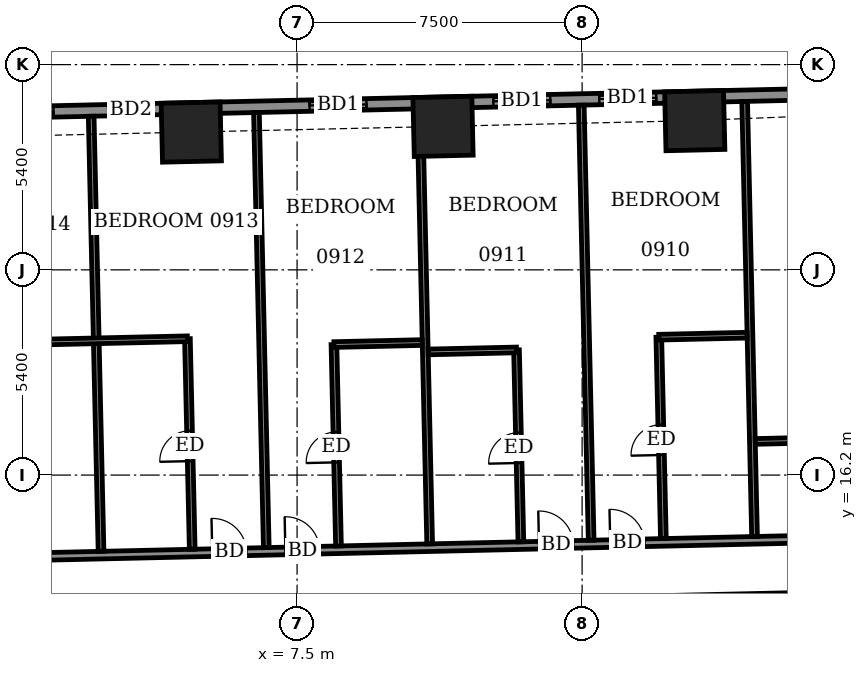
"""IFC4 building model, lengths in metres.
Left out: names, types, materials, properties, quantities, classifications, styles, units other than length and angle.
Written with IfcOpenShell. Run it as: python <this file> out.ifc"""

import sys

from ifc_helpers import new_model, si_unit, direction, frame, frame_2d, origin, origin_2d, place, context, subcontext, project, spatial, rectangle, extrude, element, fill, save


model = new_model("IFC4")
c1 = context("Model", 3, precision=1e-05, world=origin(), true_north=direction((0.0, 1.0)))
c2 = subcontext(c1, "Body", "Model", "MODEL_VIEW")
j1 = project(units=[si_unit("LENGTHUNIT", "METRE"), si_unit("PLANEANGLEUNIT", "RADIAN")], contexts=[c1])
p1 = place(None, origin())
s1 = spatial("IfcSite", under=j1, at=p1, CompositionType="ELEMENT")
p2 = place(p1, origin())
s2 = spatial("IfcBuilding", under=s1, at=p2, CompositionType="ELEMENT")
p3 = place(p2, frame((0.0, 0.0, 41.3)))
s3 = spatial("IfcBuildingStorey", under=s2, at=p3, CompositionType="ELEMENT", Elevation=41.3)
for number, where, z_axis, x_axis in (
    (1, (17.964, 25.526, -0.55), (0.0, 0.0, 1.0), (-1.0, -0.023, 0.0)),
    (2, (11.341, 25.375, -0.55), (0.0, 0.0, 1.0), (-1.0, -0.023, 0.0)),
    (3, (4.717, 25.225, -0.55), (0.0, 0.0, 1.0), (-1.0, -0.023, 0.0)),
):
    element("IfcColumn", number, at=place(p3, frame(where, z_axis=z_axis, x_axis=x_axis)), inside=s3, PredefinedType="COLUMN", context=c2, shape_type="SweptSolid", body=[
        extrude(rectangle(XDim=1.55, YDim=1.55, at=origin_2d()), origin(), (0.0, 0.0, 1.0), 3.6),
    ])
p4 = place(p3, frame((24.423, 26.298, 0.0), z_axis=(0.0, 0.0, 1.0), x_axis=(-0.999742433108, -0.022695097355, 0.0)))
e4 = element("IfcWall", 4, at=p4, inside=s3, PredefinedType="SOLIDWALL", context=c2, shape_type="SweptSolid", body=[
    extrude(rectangle(XDim=52.701, YDim=0.3, at=frame_2d((26.35, 0.0))), origin(), (0.0, 0.0, 1.0), 3.05),
])
p5 = place(p4, frame((2.357, 0.0, 0.0)))
e5 = element("IfcOpeningElement", 5, at=p5, cuts=e4, PredefinedType="OPENING", context=c2, shape_type="SweptSolid", body=[
    extrude(rectangle(XDim=1.5, YDim=2.4, at=frame_2d((0.75, 1.2))), frame((0.0, 0.16, 0.0), z_axis=(0.0, -1.0, 0.0), x_axis=(1.0, 0.0, 0.0)), (0.0, 0.0, 1.0), 0.32),
])
p6 = place(p4, frame((7.475, 0.0, 0.0)))
e6 = element("IfcOpeningElement", 6, at=p6, cuts=e4, PredefinedType="OPENING", context=c2, shape_type="SweptSolid", body=[
    extrude(rectangle(XDim=1.5, YDim=2.4, at=frame_2d((0.75, 1.2))), frame((0.0, 0.16, 0.0), z_axis=(0.0, -1.0, 0.0), x_axis=(1.0, 0.0, 0.0)), (0.0, 0.0, 1.0), 0.32),
])
p7 = place(p4, frame((10.262, 0.0, 0.0)))
e7 = element("IfcOpeningElement", 7, at=p7, cuts=e4, PredefinedType="OPENING", context=c2, shape_type="SweptSolid", body=[
    extrude(rectangle(XDim=1.5, YDim=2.4, at=frame_2d((0.75, 1.2))), frame((0.0, 0.16, 0.0), z_axis=(0.0, -1.0, 0.0), x_axis=(1.0, 0.0, 0.0)), (0.0, 0.0, 1.0), 0.32),
])
p8 = place(p4, frame((15.1, 0.0, 0.0)))
e8 = element("IfcOpeningElement", 8, at=p8, cuts=e4, PredefinedType="OPENING", context=c2, shape_type="SweptSolid", body=[
    extrude(rectangle(XDim=1.5, YDim=2.4, at=frame_2d((0.75, 1.2))), frame((0.0, 0.16, 0.0), z_axis=(0.0, -1.0, 0.0), x_axis=(1.0, 0.0, 0.0)), (0.0, 0.0, 1.0), 0.32),
])
p9 = place(p4, frame((20.7, 0.0, 0.0)))
e9 = element("IfcOpeningElement", 9, at=p9, cuts=e4, PredefinedType="OPENING", context=c2, shape_type="SweptSolid", body=[
    extrude(rectangle(XDim=1.2, YDim=2.4, at=frame_2d((0.6, 1.2))), frame((0.0, 0.16, 0.0), z_axis=(0.0, -1.0, 0.0), x_axis=(1.0, 0.0, 0.0)), (0.0, 0.0, 1.0), 0.32),
])
p10 = place(p4, frame((23.337, 0.0, 0.0)))
e10 = element("IfcOpeningElement", 10, at=p10, cuts=e4, PredefinedType="OPENING", context=c2, shape_type="SweptSolid", body=[
    extrude(rectangle(XDim=1.5, YDim=2.4, at=frame_2d((0.75, 1.2))), frame((0.0, 0.16, 0.0), z_axis=(0.0, -1.0, 0.0), x_axis=(1.0, 0.0, 0.0)), (0.0, 0.0, 1.0), 0.32),
])
p11 = place(p4, frame((28.238, 0.0, 0.0)))
e11 = element("IfcOpeningElement", 11, at=p11, cuts=e4, PredefinedType="OPENING", context=c2, shape_type="SweptSolid", body=[
    extrude(rectangle(XDim=1.5, YDim=2.4, at=frame_2d((0.75, 1.2))), frame((0.0, 0.16, 0.0), z_axis=(0.0, -1.0, 0.0), x_axis=(1.0, 0.0, 0.0)), (0.0, 0.0, 1.0), 0.32),
])
p12 = place(p4, frame((33.9, 0.0, 0.0)))
e12 = element("IfcOpeningElement", 12, at=p12, cuts=e4, PredefinedType="OPENING", context=c2, shape_type="SweptSolid", body=[
    extrude(rectangle(XDim=1.2, YDim=2.4, at=frame_2d((0.6, 1.2))), frame((0.0, 0.16, 0.0), z_axis=(0.0, -1.0, 0.0), x_axis=(1.0, 0.0, 0.0)), (0.0, 0.0, 1.0), 0.32),
])
p13 = place(p4, frame((36.538, 0.0, 0.0)))
e13 = element("IfcOpeningElement", 13, at=p13, cuts=e4, PredefinedType="OPENING", context=c2, shape_type="SweptSolid", body=[
    extrude(rectangle(XDim=1.5, YDim=2.4, at=frame_2d((0.75, 1.2))), frame((0.0, 0.16, 0.0), z_axis=(0.0, -1.0, 0.0), x_axis=(1.0, 0.0, 0.0)), (0.0, 0.0, 1.0), 0.32),
])
p14 = place(p4, frame((41.338, 0.0, 0.0)))
e14 = element("IfcOpeningElement", 14, at=p14, cuts=e4, PredefinedType="OPENING", context=c2, shape_type="SweptSolid", body=[
    extrude(rectangle(XDim=1.5, YDim=2.4, at=frame_2d((0.75, 1.2))), frame((0.0, 0.16, 0.0), z_axis=(0.0, -1.0, 0.0), x_axis=(1.0, 0.0, 0.0)), (0.0, 0.0, 1.0), 0.32),
])
p15 = place(p4, frame((44.4, 0.0, 0.9)))
e15 = element("IfcOpeningElement", 15, at=p15, cuts=e4, PredefinedType="OPENING", context=c2, shape_type="SweptSolid", body=[
    extrude(rectangle(XDim=0.9, YDim=1.5, at=frame_2d((0.45, 0.75))), frame((0.0, 0.16, 0.0), z_axis=(0.0, -1.0, 0.0), x_axis=(1.0, 0.0, 0.0)), (0.0, 0.0, 1.0), 0.32),
])
p16 = place(p4, frame((48.764, 0.0, 0.9)))
e16 = element("IfcOpeningElement", 16, at=p16, cuts=e4, PredefinedType="OPENING", context=c2, shape_type="SweptSolid", body=[
    extrude(rectangle(XDim=2.4, YDim=1.5, at=frame_2d((1.2, 0.75))), frame((0.0, 0.16, 0.0), z_axis=(0.0, -1.0, 0.0), x_axis=(1.0, 0.0, 0.0)), (0.0, 0.0, 1.0), 0.32),
])
p17 = place(p3, frame((-1.953, 27.149, 0.0), z_axis=(0.0, 0.0, 1.0), x_axis=(0.999743226877, 0.02266010399, 0.0)))
e17 = element("IfcWall", 17, at=p17, inside=s3, PredefinedType="USERDEFINED", context=c2, shape_type="SweptSolid", body=[
    extrude(rectangle(XDim=5.699, YDim=0.55, at=frame_2d((2.85, 0.0))), origin(), (0.0, 0.0, 1.0), 0.8),
])
p18 = place(p3, frame((17.742, 27.596, 0.0), z_axis=(0.0, 0.0, 1.0), x_axis=(0.999743094499, 0.022665943652, 0.0)))
e18 = element("IfcWall", 18, at=p18, inside=s3, PredefinedType="USERDEFINED", context=c2, shape_type="SweptSolid", body=[
    extrude(rectangle(XDim=6.0, YDim=0.55, at=frame_2d((3.0, 0.0))), origin(), (0.0, 0.0, 1.0), 0.8),
])
p19 = place(p3, frame((16.679, 12.918, 0.0), z_axis=(0.0, 0.0, 1.0), x_axis=(0.999742162372, 0.022707020428, 0.0)))
e19 = element("IfcWall", 19, at=p19, inside=s3, PredefinedType="PARTITIONING", context=c2, shape_type="SweptSolid", body=[
    extrude(rectangle(XDim=10.795, YDim=0.2, at=frame_2d((5.397, 0.0))), origin(), (0.0, 0.0, 1.0), 3.05),
])
p20 = place(p19, frame((5.598, 0.0, 0.0)))
e20 = element("IfcOpeningElement", 20, at=p20, cuts=e19, PredefinedType="OPENING", context=c2, shape_type="SweptSolid", body=[
    extrude(rectangle(XDim=1.0, YDim=2.1, at=frame_2d((0.5, 1.05))), frame((0.0, 0.11, 0.0), z_axis=(0.0, -1.0, 0.0), x_axis=(1.0, 0.0, 0.0)), (0.0, 0.0, 1.0), 0.22),
])
p21 = place(p3, frame((-31.347, 13.329, 0.0), z_axis=(0.0, 0.0, 1.0), x_axis=(0.999742613079, 0.022687168058, 0.0)))
e21 = element("IfcWall", 21, at=p21, inside=s3, PredefinedType="PARTITIONING", context=c2, shape_type="SweptSolid", body=[
    extrude(rectangle(XDim=58.799, YDim=0.2, at=frame_2d((29.399, 0.0))), origin(), (0.0, 0.0, 1.0), 3.05),
])
p22 = place(p21, frame((56.45, 0.0, 0.0)))
e22 = element("IfcOpeningElement", 22, at=p22, cuts=e21, PredefinedType="OPENING", context=c2, shape_type="SweptSolid", body=[
    extrude(rectangle(XDim=1.0, YDim=2.1, at=frame_2d((0.5, 1.05))), frame((0.0, 0.11, 0.0), z_axis=(0.0, -1.0, 0.0), x_axis=(1.0, 0.0, 0.0)), (0.0, 0.0, 1.0), 0.22),
])
p23 = place(p21, frame((51.85, 0.0, 0.0)))
e23 = element("IfcOpeningElement", 23, at=p23, cuts=e21, PredefinedType="OPENING", context=c2, shape_type="SweptSolid", body=[
    extrude(rectangle(XDim=0.9, YDim=2.1, at=frame_2d((0.45, 1.05))), frame((0.0, 0.11, 0.0), z_axis=(0.0, -1.0, 0.0), x_axis=(1.0, 0.0, 0.0)), (0.0, 0.0, 1.0), 0.22),
])
p24 = place(p21, frame((47.1, 0.0, 0.0)))
e24 = element("IfcOpeningElement", 24, at=p24, cuts=e21, PredefinedType="OPENING", context=c2, shape_type="SweptSolid", body=[
    extrude(rectangle(XDim=0.9, YDim=2.1, at=frame_2d((0.45, 1.05))), frame((0.0, 0.11, 0.0), z_axis=(0.0, -1.0, 0.0), x_axis=(1.0, 0.0, 0.0)), (0.0, 0.0, 1.0), 0.22),
])
p25 = place(p21, frame((45.225, 0.0, 0.0)))
e25 = element("IfcOpeningElement", 25, at=p25, cuts=e21, PredefinedType="OPENING", context=c2, shape_type="SweptSolid", body=[
    extrude(rectangle(XDim=0.9, YDim=2.1, at=frame_2d((0.45, 1.05))), frame((0.0, 0.11, 0.0), z_axis=(0.0, -1.0, 0.0), x_axis=(1.0, 0.0, 0.0)), (0.0, 0.0, 1.0), 0.22),
])
p26 = place(p21, frame((38.55, 0.0, 0.0)))
e26 = element("IfcOpeningElement", 26, at=p26, cuts=e21, PredefinedType="OPENING", context=c2, shape_type="SweptSolid", body=[
    extrude(rectangle(XDim=0.9, YDim=2.1, at=frame_2d((0.45, 1.05))), frame((0.0, 0.11, 0.0), z_axis=(0.0, -1.0, 0.0), x_axis=(1.0, 0.0, 0.0)), (0.0, 0.0, 1.0), 0.22),
])
p27 = place(p21, frame((36.625, 0.0, 0.0)))
e27 = element("IfcOpeningElement", 27, at=p27, cuts=e21, PredefinedType="OPENING", context=c2, shape_type="SweptSolid", body=[
    extrude(rectangle(XDim=0.9, YDim=2.1, at=frame_2d((0.45, 1.05))), frame((0.0, 0.11, 0.0), z_axis=(0.0, -1.0, 0.0), x_axis=(1.0, 0.0, 0.0)), (0.0, 0.0, 1.0), 0.22),
])
p28 = place(p21, frame((29.875, 0.0, 0.0)))
e28 = element("IfcOpeningElement", 28, at=p28, cuts=e21, PredefinedType="OPENING", context=c2, shape_type="SweptSolid", body=[
    extrude(rectangle(XDim=0.9, YDim=2.1, at=frame_2d((0.45, 1.05))), frame((0.0, 0.11, 0.0), z_axis=(0.0, -1.0, 0.0), x_axis=(1.0, 0.0, 0.0)), (0.0, 0.0, 1.0), 0.22),
])
p29 = place(p21, frame((27.9, 0.0, 0.0)))
e29 = element("IfcOpeningElement", 29, at=p29, cuts=e21, PredefinedType="OPENING", context=c2, shape_type="SweptSolid", body=[
    extrude(rectangle(XDim=0.9, YDim=2.1, at=frame_2d((0.45, 1.05))), frame((0.0, 0.11, 0.0), z_axis=(0.0, -1.0, 0.0), x_axis=(1.0, 0.0, 0.0)), (0.0, 0.0, 1.0), 0.22),
])
p30 = place(p21, frame((21.1, 0.0, 0.0)))
e30 = element("IfcOpeningElement", 30, at=p30, cuts=e21, PredefinedType="OPENING", context=c2, shape_type="SweptSolid", body=[
    extrude(rectangle(XDim=0.9, YDim=2.1, at=frame_2d((0.45, 1.05))), frame((0.0, 0.11, 0.0), z_axis=(0.0, -1.0, 0.0), x_axis=(1.0, 0.0, 0.0)), (0.0, 0.0, 1.0), 0.22),
])
p31 = place(p21, frame((19.175, 0.0, 0.0)))
e31 = element("IfcOpeningElement", 31, at=p31, cuts=e21, PredefinedType="OPENING", context=c2, shape_type="SweptSolid", body=[
    extrude(rectangle(XDim=0.9, YDim=2.1, at=frame_2d((0.45, 1.05))), frame((0.0, 0.11, 0.0), z_axis=(0.0, -1.0, 0.0), x_axis=(1.0, 0.0, 0.0)), (0.0, 0.0, 1.0), 0.22),
])
p32 = place(p21, frame((12.5, 0.0, 0.0)))
e32 = element("IfcOpeningElement", 32, at=p32, cuts=e21, PredefinedType="OPENING", context=c2, shape_type="SweptSolid", body=[
    extrude(rectangle(XDim=0.9, YDim=2.1, at=frame_2d((0.45, 1.05))), frame((0.0, 0.11, 0.0), z_axis=(0.0, -1.0, 0.0), x_axis=(1.0, 0.0, 0.0)), (0.0, 0.0, 1.0), 0.22),
])
p33 = place(p21, frame((10.575, 0.0, 0.0)))
e33 = element("IfcOpeningElement", 33, at=p33, cuts=e21, PredefinedType="OPENING", context=c2, shape_type="SweptSolid", body=[
    extrude(rectangle(XDim=0.9, YDim=2.1, at=frame_2d((0.45, 1.05))), frame((0.0, 0.11, 0.0), z_axis=(0.0, -1.0, 0.0), x_axis=(1.0, 0.0, 0.0)), (0.0, 0.0, 1.0), 0.22),
])
p34 = place(p21, frame((1.425, 0.0, 0.0)))
e34 = element("IfcOpeningElement", 34, at=p34, cuts=e21, PredefinedType="OPENING", context=c2, shape_type="SweptSolid", body=[
    extrude(rectangle(XDim=1.0, YDim=2.1, at=frame_2d((0.5, 1.05))), frame((0.0, 0.11, 0.0), z_axis=(0.0, -1.0, 0.0), x_axis=(1.0, 0.0, 0.0)), (0.0, 0.0, 1.0), 0.22),
])
p35 = place(p21, frame((6.0, 0.0, 0.0)))
e35 = element("IfcOpeningElement", 35, at=p35, cuts=e21, PredefinedType="OPENING", context=c2, shape_type="SweptSolid", body=[
    extrude(rectangle(XDim=0.9, YDim=2.1, at=frame_2d((0.45, 1.05))), frame((0.0, 0.11, 0.0), z_axis=(0.0, -1.0, 0.0), x_axis=(1.0, 0.0, 0.0)), (0.0, 0.0, 1.0), 0.22),
])
p36 = place(p3, frame((2.342, 14.194, 0.0), z_axis=(0.0, 0.0, 1.0), x_axis=(-0.022708327922, 0.999742132674, 0.0)))
e36 = element("IfcWall", 36, at=p36, inside=s3, PredefinedType="PARTITIONING", context=c2, shape_type="SweptSolid", body=[
    extrude(rectangle(XDim=11.45, YDim=0.15, at=frame_2d((5.725, 0.0))), origin(), (0.0, 0.0, 1.0), 2.55),
])
p37 = place(p3, frame((4.741, 14.248, 0.0), z_axis=(0.0, 0.0, 1.0), x_axis=(-0.02273742063, 0.999741471433, 0.0)))
e37 = element("IfcWall", 37, at=p37, inside=s3, PredefinedType="PARTITIONING", context=c2, shape_type="SweptSolid", body=[
    extrude(rectangle(XDim=5.541, YDim=0.15, at=frame_2d((2.77, 0.0))), origin(), (0.0, 0.0, 1.0), 3.05),
])
p38 = place(p37, frame((2.32, 0.0, 0.0)))
e38 = element("IfcOpeningElement", 38, at=p38, cuts=e37, PredefinedType="OPENING", context=c2, shape_type="SweptSolid", body=[
    extrude(rectangle(XDim=0.8, YDim=2.1, at=frame_2d((0.4, 1.05))), frame((0.0, 0.085, 0.0), z_axis=(0.0, -1.0, 0.0), x_axis=(1.0, 0.0, 0.0)), (0.0, 0.0, 1.0), 0.17),
])
p39 = place(p3, frame((6.69, 14.292, 0.0), z_axis=(0.0, 0.0, 1.0), x_axis=(-0.022621153305, 0.999744108971, 0.0)))
e39 = element("IfcWall", 39, at=p39, inside=s3, PredefinedType="PARTITIONING", context=c2, shape_type="SweptSolid", body=[
    extrude(rectangle(XDim=11.451, YDim=0.15, at=frame_2d((5.726, 0.0))), origin(), (0.0, 0.0, 1.0), 2.55),
])
p40 = place(p3, frame((8.59, 14.335, 0.0), z_axis=(0.0, 0.0, 1.0), x_axis=(-0.022661766832, 0.999743189186, 0.0)))
e40 = element("IfcWall", 40, at=p40, inside=s3, PredefinedType="PARTITIONING", context=c2, shape_type="SweptSolid", body=[
    extrude(rectangle(XDim=5.301, YDim=0.15, at=frame_2d((2.65, 0.0))), origin(), (0.0, 0.0, 1.0), 3.05),
])
p41 = place(p40, frame((2.2, 0.0, 0.0)))
e41 = element("IfcOpeningElement", 41, at=p41, cuts=e40, PredefinedType="OPENING", context=c2, shape_type="SweptSolid", body=[
    extrude(rectangle(XDim=0.8, YDim=2.1, at=frame_2d((0.4, 1.05))), frame((0.0, 0.085, 0.0), z_axis=(0.0, -1.0, 0.0), x_axis=(1.0, 0.0, 0.0)), (0.0, 0.0, 1.0), 0.17),
])
p42 = place(p3, frame((10.989, 14.39, 0.0), z_axis=(0.0, 0.0, 1.0), x_axis=(-0.022623082162, 0.999744065325, 0.0)))
e42 = element("IfcWall", 42, at=p42, inside=s3, PredefinedType="PARTITIONING", context=c2, shape_type="SweptSolid", body=[
    extrude(rectangle(XDim=11.45, YDim=0.15, at=frame_2d((5.725, 0.0))), origin(), (0.0, 0.0, 1.0), 3.05),
])
p43 = place(p3, frame((13.389, 14.444, 0.0), z_axis=(0.0, 0.0, 1.0), x_axis=(-0.022769723731, 0.999740736232, 0.0)))
e43 = element("IfcWall", 43, at=p43, inside=s3, PredefinedType="PARTITIONING", context=c2, shape_type="SweptSolid", body=[
    extrude(rectangle(XDim=5.05, YDim=0.15, at=frame_2d((2.525, 0.0))), origin(), (0.0, 0.0, 1.0), 3.05),
])
p44 = place(p43, frame((2.075, 0.0, 0.0)))
e44 = element("IfcOpeningElement", 44, at=p44, cuts=e43, PredefinedType="OPENING", context=c2, shape_type="SweptSolid", body=[
    extrude(rectangle(XDim=0.8, YDim=2.1, at=frame_2d((0.4, 1.05))), frame((0.0, 0.085, 0.0), z_axis=(0.0, -1.0, 0.0), x_axis=(1.0, 0.0, 0.0)), (0.0, 0.0, 1.0), 0.17),
])
p45 = place(p3, frame((15.238, 14.486, 0.0), z_axis=(0.0, 0.0, 1.0), x_axis=(-0.022706391805, 0.999742176649, 0.0)))
e45 = element("IfcWall", 45, at=p45, inside=s3, PredefinedType="PARTITIONING", context=c2, shape_type="SweptSolid", body=[
    extrude(rectangle(XDim=11.451, YDim=0.15, at=frame_2d((5.726, 0.0))), origin(), (0.0, 0.0, 1.0), 2.55),
])
p46 = place(p3, frame((17.138, 14.529, 0.0), z_axis=(0.0, 0.0, 1.0), x_axis=(-0.022616771387, 0.999744208111, 0.0)))
e46 = element("IfcWall", 46, at=p46, inside=s3, PredefinedType="PARTITIONING", context=c2, shape_type="SweptSolid", body=[
    extrude(rectangle(XDim=5.3, YDim=0.15, at=frame_2d((2.65, 0.0))), origin(), (0.0, 0.0, 1.0), 3.05),
])
p47 = place(p46, frame((2.2, 0.0, 0.0)))
e47 = element("IfcOpeningElement", 47, at=p47, cuts=e46, PredefinedType="OPENING", context=c2, shape_type="SweptSolid", body=[
    extrude(rectangle(XDim=0.8, YDim=2.1, at=frame_2d((0.4, 1.05))), frame((0.0, 0.085, 0.0), z_axis=(0.0, -1.0, 0.0), x_axis=(1.0, 0.0, 0.0)), (0.0, 0.0, 1.0), 0.17),
])
p48 = place(p3, frame((19.537, 14.584, 0.0), z_axis=(0.0, 0.0, 1.0), x_axis=(-0.022708327922, 0.999742132674, 0.0)))
e48 = element("IfcWall", 48, at=p48, inside=s3, PredefinedType="PARTITIONING", context=c2, shape_type="SweptSolid", body=[
    extrude(rectangle(XDim=11.45, YDim=0.15, at=frame_2d((5.725, 0.0))), origin(), (0.0, 0.0, 1.0), 2.55),
])
p49 = place(p3, frame((19.555, 17.085, 0.0), z_axis=(0.0, 0.0, 1.0), x_axis=(0.999741187782, 0.022749889061, 0.0)))
e49 = element("IfcWall", 49, at=p49, inside=s3, PredefinedType="PARTITIONING", context=c2, shape_type="SweptSolid", body=[
    extrude(rectangle(XDim=2.726, YDim=0.15, at=frame_2d((1.363, 0.0))), origin(), (0.0, 0.0, 1.0), 3.05),
])
for number, where, z_axis, x_axis in (
    (50, (10.95, 19.44, 0.0), (0.0, 0.0, 1.0), (1.0, 0.023, 0.0)),
    (51, (8.47, 19.634, 0.0), (0.0, 0.0, 1.0), (1.0, 0.023, 0.0)),
    (52, (17.018, 19.828, 0.0), (0.0, 0.0, 1.0), (1.0, 0.023, 0.0)),
):
    element("IfcWall", number, at=place(p3, frame(where, z_axis=z_axis, x_axis=x_axis)), inside=s3, PredefinedType="PARTITIONING", context=c2, shape_type="SweptSolid", body=[
        extrude(rectangle(XDim=2.324, YDim=0.15, at=frame_2d((1.162, 0.0))), origin(), (0.0, 0.0, 1.0), 3.05),
    ])
p50 = place(p3, frame((-0.184, 19.678, 0.0), z_axis=(0.0, 0.0, 1.0), x_axis=(0.99974154664, 0.022734113616, 0.0)))
e53 = element("IfcWall", 53, at=p50, inside=s3, PredefinedType="PARTITIONING", context=c2, shape_type="SweptSolid", body=[
    extrude(rectangle(XDim=4.8, YDim=0.15, at=frame_2d((2.4, 0.0))), origin(), (0.0, 0.0, 1.0), 3.05),
])
p51 = place(p6, origin())
e54 = element("IfcDoor", 54, at=p51, inside=s3, OperationType="SLIDING_TO_LEFT", PredefinedType="DOOR", context=c2, shape_type="SweptSolid", body=[
    extrude(rectangle(XDim=1.5, YDim=2.4, at=frame_2d((0.75, 1.2))), frame((0.0, 0.025, 0.0), z_axis=(0.0, -1.0, 0.0), x_axis=(1.0, 0.0, 0.0)), (0.0, 0.0, 1.0), 0.05),
])
fill(e6, e54)
p52 = place(p7, origin())
e55 = element("IfcDoor", 55, at=p52, inside=s3, OperationType="SLIDING_TO_LEFT", PredefinedType="DOOR", context=c2, shape_type="SweptSolid", body=[
    extrude(rectangle(XDim=1.5, YDim=2.4, at=frame_2d((0.75, 1.2))), frame((0.0, 0.025, 0.0), z_axis=(0.0, -1.0, 0.0), x_axis=(1.0, 0.0, 0.0)), (0.0, 0.0, 1.0), 0.05),
])
fill(e7, e55)
p53 = place(p8, origin())
e56 = element("IfcDoor", 56, at=p53, inside=s3, OperationType="SLIDING_TO_LEFT", PredefinedType="DOOR", context=c2, shape_type="SweptSolid", body=[
    extrude(rectangle(XDim=1.5, YDim=2.4, at=frame_2d((0.75, 1.2))), frame((0.0, 0.025, 0.0), z_axis=(0.0, -1.0, 0.0), x_axis=(1.0, 0.0, 0.0)), (0.0, 0.0, 1.0), 0.05),
])
fill(e8, e56)
p54 = place(p9, origin())
e57 = element("IfcDoor", 57, at=p54, inside=s3, OperationType="SLIDING_TO_LEFT", PredefinedType="DOOR", context=c2, shape_type="SweptSolid", body=[
    extrude(rectangle(XDim=1.2, YDim=2.4, at=frame_2d((0.6, 1.2))), frame((0.0, 0.025, 0.0), z_axis=(0.0, -1.0, 0.0), x_axis=(1.0, 0.0, 0.0)), (0.0, 0.0, 1.0), 0.05),
])
fill(e9, e57)
p55 = place(p10, origin())
e58 = element("IfcDoor", 58, at=p55, inside=s3, OperationType="SLIDING_TO_LEFT", PredefinedType="DOOR", context=c2, shape_type="SweptSolid", body=[
    extrude(rectangle(XDim=1.5, YDim=2.4, at=frame_2d((0.75, 1.2))), frame((0.0, 0.025, 0.0), z_axis=(0.0, -1.0, 0.0), x_axis=(1.0, 0.0, 0.0)), (0.0, 0.0, 1.0), 0.05),
])
fill(e10, e58)
p56 = place(p24, origin())
e59 = element("IfcDoor", 59, at=p56, inside=s3, OperationType="SINGLE_SWING_RIGHT", PredefinedType="DOOR", context=c2, shape_type="SweptSolid", body=[
    extrude(rectangle(XDim=0.9, YDim=2.1, at=frame_2d((0.45, 1.05))), frame((0.0, 0.025, 0.0), z_axis=(0.0, -1.0, 0.0), x_axis=(1.0, 0.0, 0.0)), (0.0, 0.0, 1.0), 0.05),
])
fill(e24, e59)
p57 = place(p47, origin())
e60 = element("IfcDoor", 60, at=p57, inside=s3, OperationType="SINGLE_SWING_RIGHT", PredefinedType="DOOR", context=c2, shape_type="SweptSolid", body=[
    extrude(rectangle(XDim=0.8, YDim=2.1, at=frame_2d((0.4, 1.05))), frame((0.0, 0.025, 0.0), z_axis=(0.0, -1.0, 0.0), x_axis=(1.0, 0.0, 0.0)), (0.0, 0.0, 1.0), 0.05),
])
fill(e47, e60)
p58 = place(p25, origin())
e61 = element("IfcDoor", 61, at=p58, inside=s3, OperationType="SINGLE_SWING_LEFT", PredefinedType="DOOR", context=c2, shape_type="SweptSolid", body=[
    extrude(rectangle(XDim=0.9, YDim=2.1, at=frame_2d((0.45, 1.05))), frame((0.0, 0.025, 0.0), z_axis=(0.0, -1.0, 0.0), x_axis=(1.0, 0.0, 0.0)), (0.0, 0.0, 1.0), 0.05),
])
fill(e25, e61)
p59 = place(p44, origin())
e62 = element("IfcDoor", 62, at=p59, inside=s3, OperationType="SINGLE_SWING_LEFT", PredefinedType="DOOR", context=c2, shape_type="SweptSolid", body=[
    extrude(rectangle(XDim=0.8, YDim=2.1, at=frame_2d((0.4, 1.05))), frame((0.0, 0.025, 0.0), z_axis=(0.0, -1.0, 0.0), x_axis=(1.0, 0.0, 0.0)), (0.0, 0.0, 1.0), 0.05),
])
fill(e44, e62)
p60 = place(p26, origin())
e63 = element("IfcDoor", 63, at=p60, inside=s3, OperationType="SINGLE_SWING_RIGHT", PredefinedType="DOOR", context=c2, shape_type="SweptSolid", body=[
    extrude(rectangle(XDim=0.9, YDim=2.1, at=frame_2d((0.45, 1.05))), frame((0.0, 0.025, 0.0), z_axis=(0.0, -1.0, 0.0), x_axis=(1.0, 0.0, 0.0)), (0.0, 0.0, 1.0), 0.05),
])
fill(e26, e63)
p61 = place(p41, origin())
e64 = element("IfcDoor", 64, at=p61, inside=s3, OperationType="SINGLE_SWING_RIGHT", PredefinedType="DOOR", context=c2, shape_type="SweptSolid", body=[
    extrude(rectangle(XDim=0.8, YDim=2.1, at=frame_2d((0.4, 1.05))), frame((0.0, 0.025, 0.0), z_axis=(0.0, -1.0, 0.0), x_axis=(1.0, 0.0, 0.0)), (0.0, 0.0, 1.0), 0.05),
])
fill(e41, e64)
p62 = place(p27, origin())
e65 = element("IfcDoor", 65, at=p62, inside=s3, OperationType="SINGLE_SWING_LEFT", PredefinedType="DOOR", context=c2, shape_type="SweptSolid", body=[
    extrude(rectangle(XDim=0.9, YDim=2.1, at=frame_2d((0.45, 1.05))), frame((0.0, 0.025, 0.0), z_axis=(0.0, -1.0, 0.0), x_axis=(1.0, 0.0, 0.0)), (0.0, 0.0, 1.0), 0.05),
])
fill(e27, e65)
p63 = place(p38, origin())
e66 = element("IfcDoor", 66, at=p63, inside=s3, OperationType="SINGLE_SWING_LEFT", PredefinedType="DOOR", context=c2, shape_type="SweptSolid", body=[
    extrude(rectangle(XDim=0.8, YDim=2.1, at=frame_2d((0.4, 1.05))), frame((0.0, 0.025, 0.0), z_axis=(0.0, -1.0, 0.0), x_axis=(1.0, 0.0, 0.0)), (0.0, 0.0, 1.0), 0.05),
])
fill(e38, e66)
save(model, sys.argv[1])
